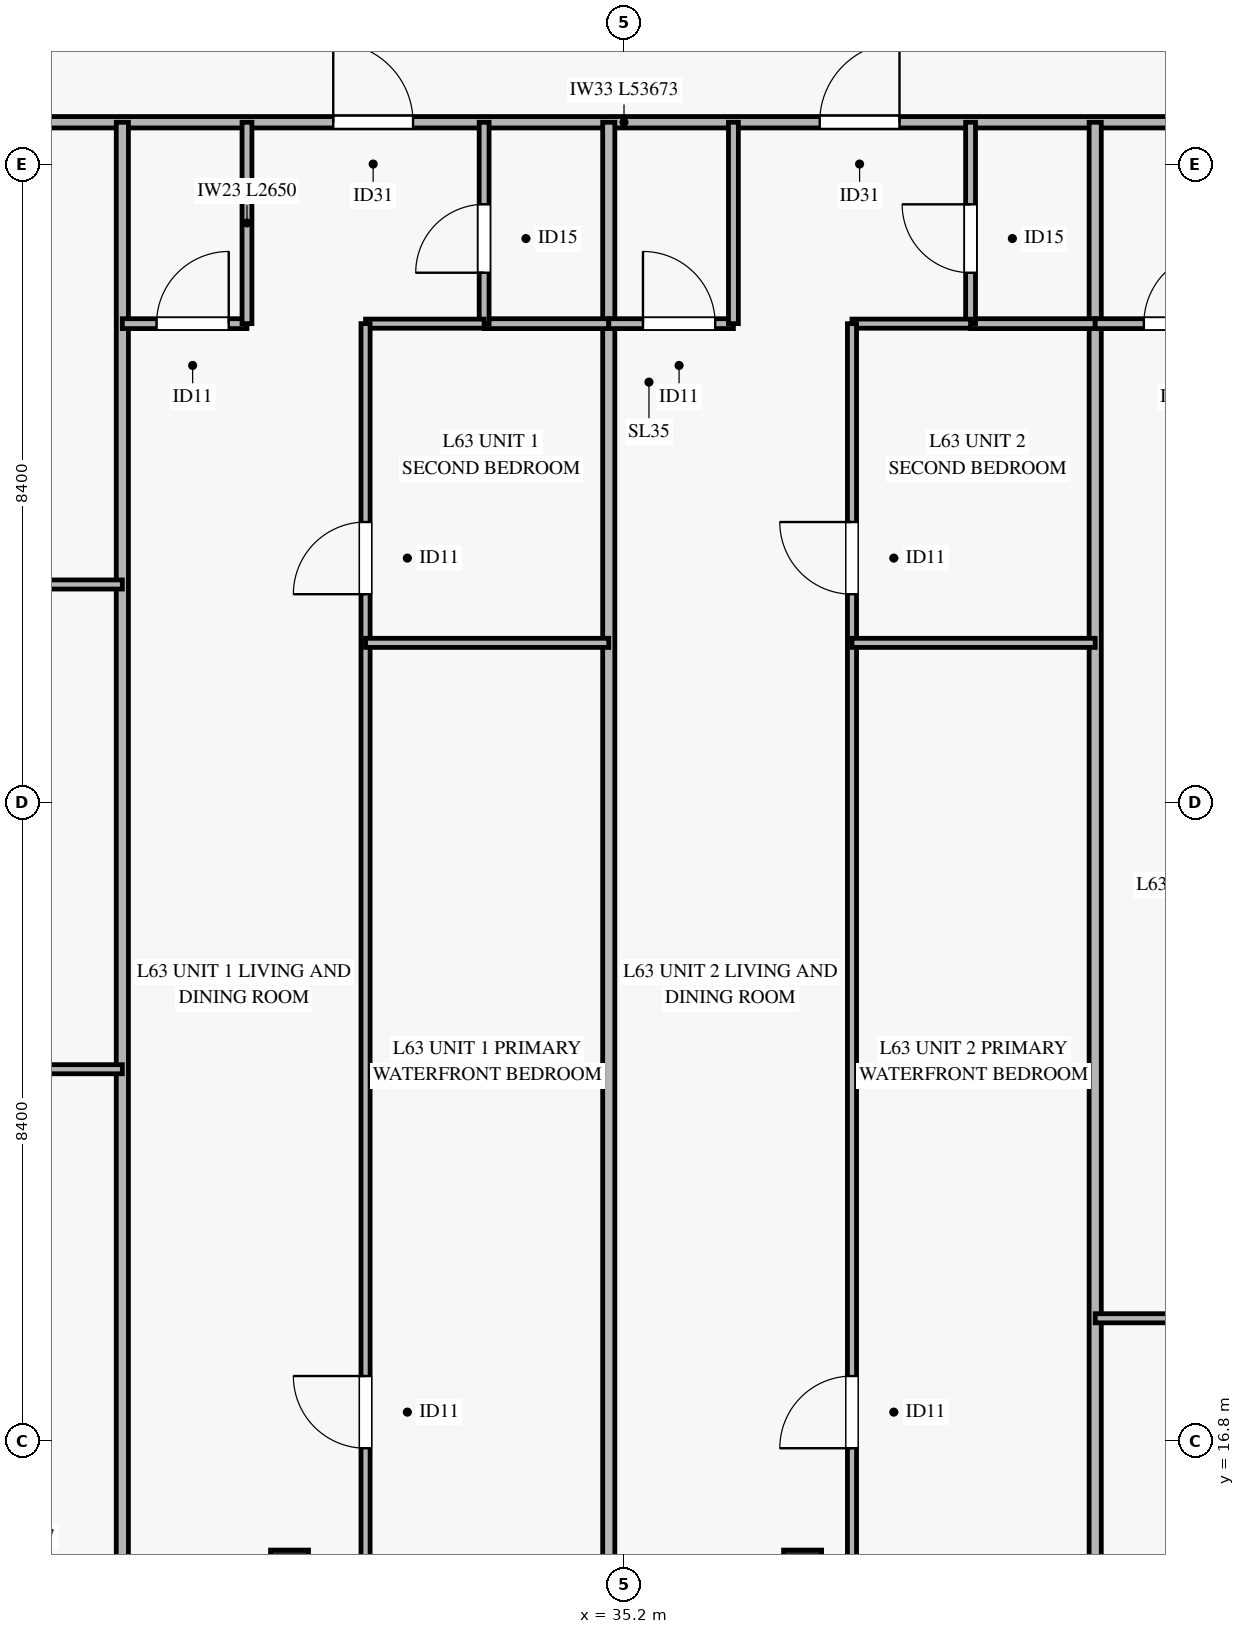
"""IFC4 building model, lengths in metres.
Left out: names, types, materials, properties, quantities, classifications, styles, units other than length and angle.
Written with IfcOpenShell. Run it as: python <this file> out.ifc"""

import sys

from ifc_helpers import new_model, si_unit, direction, frame, frame_2d, origin, origin_2d, place, context, subcontext, project, spatial, rectangle, hollow_rectangle, extrude, source, transform, mapped, element, fill, save


model = new_model("IFC4")
c1 = context("Model", 3, precision=1e-05, world=origin(), true_north=direction((0.0, 1.0)))
c2 = subcontext(c1, "Body", "Model", "MODEL_VIEW")
j1 = project(units=[si_unit("LENGTHUNIT", "METRE"), si_unit("PLANEANGLEUNIT", "RADIAN")], contexts=[c1])
p1 = place(None, origin())
s1 = spatial("IfcSite", under=j1, at=p1, CompositionType="ELEMENT")
p2 = place(p1, origin())
s2 = spatial("IfcBuilding", under=s1, at=p2, CompositionType="ELEMENT")
p3 = place(p2, frame((0.0, 0.0, 248.5)))
s3 = spatial("IfcBuildingStorey", under=s2, at=p3, CompositionType="ELEMENT", Elevation=248.5)
m1 = source(origin(), c2, "Body", "SweptSolid", [
    extrude(hollow_rectangle(XDim=0.5, YDim=0.5, WallThickness=0.024, at=origin_2d()), origin(), (0.0, 0.0, 1.0), 3.185),
])
for number, where, z_axis, x_axis in (
    (1, (30.8, 15.113, 0.0), (0.0, 0.0, 1.0), (1.0, 0.0, 0.0)),
    (2, (37.55, 15.113, 0.0), (0.0, 0.0, 1.0), (1.0, 0.0, 0.0)),
):
    element("IfcColumn", number, at=place(p3, frame(where, z_axis=z_axis, x_axis=x_axis)), inside=s3, PredefinedType="COLUMN", context=c2, shape_type="MappedRepresentation", body=[
        mapped(m1, transform((0.0, 0.0, 0.0), x_axis=(1.0, 0.0, 0.0), y_axis=(0.0, 1.0, 0.0), z_axis=(0.0, 0.0, 1.0), scale=1.0)),
    ])
p4 = place(p3, frame((8.364, 34.15, 0.0), z_axis=(0.0, 0.0, 1.0), x_axis=(1.0, 0.0, 0.0)))
e3 = element("IfcWall", 3, at=p4, inside=s3, PredefinedType="PARTITIONING", context=c2, shape_type="SweptSolid", body=[
    extrude(rectangle(XDim=53.673, YDim=0.15, at=frame_2d((26.836, 0.0))), origin(), (0.0, 0.0, 1.0), 2.47),
])
p5 = place(p4, frame((5.627, 0.0, 0.0)))
e4 = element("IfcOpeningElement", 4, at=p5, cuts=e3, PredefinedType="OPENING", context=c2, shape_type="SweptSolid", body=[
    extrude(rectangle(XDim=1.05, YDim=2.15, at=frame_2d((0.525, 1.075))), frame((0.0, 0.085, 0.0), z_axis=(0.0, -1.0, 0.0), x_axis=(1.0, 0.0, 0.0)), (0.0, 0.0, 1.0), 0.17),
])
p6 = place(p4, frame((16.561, 0.0, 0.0)))
e5 = element("IfcOpeningElement", 5, at=p6, cuts=e3, PredefinedType="OPENING", context=c2, shape_type="SweptSolid", body=[
    extrude(rectangle(XDim=1.05, YDim=2.15, at=frame_2d((0.525, 1.075))), frame((0.0, 0.085, 0.0), z_axis=(0.0, -1.0, 0.0), x_axis=(1.0, 0.0, 0.0)), (0.0, 0.0, 1.0), 0.17),
])
p7 = place(p4, frame((23.011, 0.0, 0.0)))
e6 = element("IfcOpeningElement", 6, at=p7, cuts=e3, PredefinedType="OPENING", context=c2, shape_type="SweptSolid", body=[
    extrude(rectangle(XDim=1.05, YDim=2.15, at=frame_2d((0.525, 1.075))), frame((0.0, 0.085, 0.0), z_axis=(0.0, -1.0, 0.0), x_axis=(1.0, 0.0, 0.0)), (0.0, 0.0, 1.0), 0.17),
])
p8 = place(p4, frame((29.411, 0.0, 0.0)))
e7 = element("IfcOpeningElement", 7, at=p8, cuts=e3, PredefinedType="OPENING", context=c2, shape_type="SweptSolid", body=[
    extrude(rectangle(XDim=1.05, YDim=2.15, at=frame_2d((0.525, 1.075))), frame((0.0, 0.085, 0.0), z_axis=(0.0, -1.0, 0.0), x_axis=(1.0, 0.0, 0.0)), (0.0, 0.0, 1.0), 0.17),
])
p9 = place(p4, frame((36.511, 0.0, 0.0)))
e8 = element("IfcOpeningElement", 8, at=p9, cuts=e3, PredefinedType="OPENING", context=c2, shape_type="SweptSolid", body=[
    extrude(rectangle(XDim=1.05, YDim=2.15, at=frame_2d((0.525, 1.075))), frame((0.0, 0.085, 0.0), z_axis=(0.0, -1.0, 0.0), x_axis=(1.0, 0.0, 0.0)), (0.0, 0.0, 1.0), 0.17),
])
p10 = place(p4, frame((45.807, 0.0, 0.0)))
e9 = element("IfcOpeningElement", 9, at=p10, cuts=e3, PredefinedType="OPENING", context=c2, shape_type="SweptSolid", body=[
    extrude(rectangle(XDim=1.05, YDim=2.15, at=frame_2d((0.525, 1.075))), frame((0.0, 0.085, 0.0), z_axis=(0.0, -1.0, 0.0), x_axis=(1.0, 0.0, 0.0)), (0.0, 0.0, 1.0), 0.17),
])
for number, where, z_axis, x_axis in (
    (10, (28.6, 15.113, 0.0), (0.0, 0.0, 1.0), (0.0, 1.0, 0.0)),
    (11, (35.0, 15.113, 0.0), (0.0, 0.0, 1.0), (0.0, 1.0, 0.0)),
    (12, (41.4, 15.113, 0.0), (0.0, 0.0, 1.0), (0.0, 1.0, 0.0)),
):
    element("IfcWall", number, at=place(p3, frame(where, z_axis=z_axis, x_axis=x_axis)), inside=s3, PredefinedType="PARTITIONING", context=c2, shape_type="SweptSolid", body=[
        extrude(rectangle(XDim=19.037, YDim=0.16, at=frame_2d((9.519, 0.0))), origin(), (0.0, 0.0, 1.0), 2.77),
    ])
p11 = place(p3, frame((22.4, 21.69, 0.0), z_axis=(0.0, 0.0, 1.0), x_axis=(1.0, 0.0, 0.0)))
e13 = element("IfcWall", 13, at=p11, inside=s3, PredefinedType="PARTITIONING", context=c2, shape_type="SweptSolid", body=[
    extrude(rectangle(XDim=6.2, YDim=0.12, at=frame_2d((3.1, 0.0))), origin(), (0.0, 0.0, 1.0), 3.185),
])
p12 = place(p11, frame((2.646, 0.0, 0.0)))
e14 = element("IfcOpeningElement", 14, at=p12, cuts=e13, PredefinedType="OPENING", context=c2, shape_type="SweptSolid", body=[
    extrude(rectangle(XDim=0.95, YDim=2.1, at=frame_2d((0.475, 1.05))), frame((0.0, 0.07, 0.0), z_axis=(0.0, -1.0, 0.0), x_axis=(1.0, 0.0, 0.0)), (0.0, 0.0, 1.0), 0.14),
])
p13 = place(p3, frame((22.4, 28.068, 0.0), z_axis=(0.0, 0.0, 1.0), x_axis=(1.0, 0.0, 0.0)))
e15 = element("IfcWall", 15, at=p13, inside=s3, PredefinedType="PARTITIONING", context=c2, shape_type="SweptSolid", body=[
    extrude(rectangle(XDim=6.2, YDim=0.12, at=frame_2d((3.1, 0.0))), origin(), (0.0, 0.0, 1.0), 3.185),
])
p14 = place(p13, frame((2.646, 0.0, 0.0)))
e16 = element("IfcOpeningElement", 16, at=p14, cuts=e15, PredefinedType="OPENING", context=c2, shape_type="SweptSolid", body=[
    extrude(rectangle(XDim=0.95, YDim=2.1, at=frame_2d((0.475, 1.05))), frame((0.0, 0.07, 0.0), z_axis=(0.0, -1.0, 0.0), x_axis=(1.0, 0.0, 0.0)), (0.0, 0.0, 1.0), 0.14),
])
p15 = place(p3, frame((28.6, 31.5, 0.0), z_axis=(0.0, 0.0, 1.0), x_axis=(1.0, 0.0, 0.0)))
e17 = element("IfcWall", 17, at=p15, inside=s3, PredefinedType="PARTITIONING", context=c2, shape_type="SweptSolid", body=[
    extrude(rectangle(XDim=1.64, YDim=0.13, at=frame_2d((0.82, 0.0))), origin(), (0.0, 0.0, 1.0), 3.185),
])
p16 = place(p15, frame((0.45, 0.0, 0.0)))
e18 = element("IfcOpeningElement", 18, at=p16, cuts=e17, PredefinedType="OPENING", context=c2, shape_type="SweptSolid", body=[
    extrude(rectangle(XDim=0.95, YDim=2.1, at=frame_2d((0.475, 1.05))), frame((0.0, 0.075, 0.0), z_axis=(0.0, -1.0, 0.0), x_axis=(1.0, 0.0, 0.0)), (0.0, 0.0, 1.0), 0.15),
])
p17 = place(p3, frame((30.24, 31.5, 0.0), z_axis=(0.0, 0.0, 1.0), x_axis=(0.0, 1.0, 0.0)))
e19 = element("IfcWall", 19, at=p17, inside=s3, PredefinedType="PARTITIONING", context=c2, shape_type="SweptSolid", body=[
    extrude(rectangle(XDim=2.65, YDim=0.13, at=frame_2d((1.325, 0.0))), origin(), (0.0, 0.0, 1.0), 2.77),
])
p18 = place(p3, frame((33.36, 31.5, 0.0), z_axis=(0.0, 0.0, 1.0), x_axis=(1.0, 0.0, 0.0)))
e20 = element("IfcWall", 20, at=p18, inside=s3, PredefinedType="PARTITIONING", context=c2, shape_type="SweptSolid", body=[
    extrude(rectangle(XDim=1.64, YDim=0.13, at=frame_2d((0.82, 0.0))), origin(), (0.0, 0.0, 1.0), 3.185),
])
p19 = place(p3, frame((33.36, 31.5, 0.0), z_axis=(0.0, 0.0, 1.0), x_axis=(0.0, 1.0, 0.0)))
e21 = element("IfcWall", 21, at=p19, inside=s3, PredefinedType="PARTITIONING", context=c2, shape_type="SweptSolid", body=[
    extrude(rectangle(XDim=2.65, YDim=0.13, at=frame_2d((1.325, 0.0))), origin(), (0.0, 0.0, 1.0), 2.77),
])
p20 = place(p19, frame((0.67, 0.0, 0.0)))
e22 = element("IfcOpeningElement", 22, at=p20, cuts=e21, PredefinedType="OPENING", context=c2, shape_type="SweptSolid", body=[
    extrude(rectangle(XDim=0.9, YDim=2.1, at=frame_2d((0.45, 1.05))), frame((0.0, 0.075, 0.0), z_axis=(0.0, -1.0, 0.0), x_axis=(1.0, 0.0, 0.0)), (0.0, 0.0, 1.0), 0.15),
])
p21 = place(p3, frame((31.8, 31.5, 0.0), z_axis=(0.0, 0.0, 1.0), x_axis=(1.0, 0.0, 0.0)))
e23 = element("IfcWall", 23, at=p21, inside=s3, PredefinedType="PARTITIONING", context=c2, shape_type="SweptSolid", body=[
    extrude(rectangle(XDim=1.56, YDim=0.12, at=frame_2d((0.78, 0.0))), origin(), (0.0, 0.0, 1.0), 3.185),
])
p22 = place(p3, frame((31.8, 15.113, 0.0), z_axis=(0.0, 0.0, 1.0), x_axis=(0.0, 1.0, 0.0)))
e24 = element("IfcWall", 24, at=p22, inside=s3, PredefinedType="PARTITIONING", context=c2, shape_type="SweptSolid", body=[
    extrude(rectangle(XDim=16.387, YDim=0.12, at=frame_2d((8.193, 0.0))), origin(), (0.0, 0.0, 1.0), 2.77),
])
p23 = place(p22, frame((1.59, 0.0, 0.0)))
e25 = element("IfcOpeningElement", 25, at=p23, cuts=e24, PredefinedType="OPENING", context=c2, shape_type="SweptSolid", body=[
    extrude(rectangle(XDim=0.95, YDim=2.1, at=frame_2d((0.475, 1.05))), frame((0.0, 0.07, 0.0), z_axis=(0.0, -1.0, 0.0), x_axis=(1.0, 0.0, 0.0)), (0.0, 0.0, 1.0), 0.14),
])
p24 = place(p22, frame((12.827, 0.0, 0.0)))
e26 = element("IfcOpeningElement", 26, at=p24, cuts=e24, PredefinedType="OPENING", context=c2, shape_type="SweptSolid", body=[
    extrude(rectangle(XDim=0.95, YDim=2.1, at=frame_2d((0.475, 1.05))), frame((0.0, 0.07, 0.0), z_axis=(0.0, -1.0, 0.0), x_axis=(1.0, 0.0, 0.0)), (0.0, 0.0, 1.0), 0.14),
])
p25 = place(p3, frame((31.8, 27.3, 0.0), z_axis=(0.0, 0.0, 1.0), x_axis=(1.0, 0.0, 0.0)))
e27 = element("IfcWall", 27, at=p25, inside=s3, PredefinedType="PARTITIONING", context=c2, shape_type="SweptSolid", body=[
    extrude(rectangle(XDim=3.2, YDim=0.12, at=frame_2d((1.6, 0.0))), origin(), (0.0, 0.0, 1.0), 3.185),
])
p26 = place(p3, frame((35.0, 31.5, 0.0), z_axis=(0.0, 0.0, 1.0), x_axis=(1.0, 0.0, 0.0)))
e28 = element("IfcWall", 28, at=p26, inside=s3, PredefinedType="PARTITIONING", context=c2, shape_type="SweptSolid", body=[
    extrude(rectangle(XDim=1.64, YDim=0.13, at=frame_2d((0.82, 0.0))), origin(), (0.0, 0.0, 1.0), 3.185),
])
p27 = place(p26, frame((0.45, 0.0, 0.0)))
e29 = element("IfcOpeningElement", 29, at=p27, cuts=e28, PredefinedType="OPENING", context=c2, shape_type="SweptSolid", body=[
    extrude(rectangle(XDim=0.95, YDim=2.1, at=frame_2d((0.475, 1.05))), frame((0.0, 0.075, 0.0), z_axis=(0.0, -1.0, 0.0), x_axis=(1.0, 0.0, 0.0)), (0.0, 0.0, 1.0), 0.15),
])
p28 = place(p3, frame((36.64, 31.5, 0.0), z_axis=(0.0, 0.0, 1.0), x_axis=(0.0, 1.0, 0.0)))
e30 = element("IfcWall", 30, at=p28, inside=s3, PredefinedType="PARTITIONING", context=c2, shape_type="SweptSolid", body=[
    extrude(rectangle(XDim=2.65, YDim=0.13, at=frame_2d((1.325, 0.0))), origin(), (0.0, 0.0, 1.0), 2.77),
])
p29 = place(p3, frame((39.76, 31.5, 0.0), z_axis=(0.0, 0.0, 1.0), x_axis=(1.0, 0.0, 0.0)))
e31 = element("IfcWall", 31, at=p29, inside=s3, PredefinedType="PARTITIONING", context=c2, shape_type="SweptSolid", body=[
    extrude(rectangle(XDim=1.64, YDim=0.13, at=frame_2d((0.82, 0.0))), origin(), (0.0, 0.0, 1.0), 3.185),
])
p30 = place(p3, frame((39.76, 31.5, 0.0), z_axis=(0.0, 0.0, 1.0), x_axis=(0.0, 1.0, 0.0)))
e32 = element("IfcWall", 32, at=p30, inside=s3, PredefinedType="PARTITIONING", context=c2, shape_type="SweptSolid", body=[
    extrude(rectangle(XDim=2.65, YDim=0.13, at=frame_2d((1.325, 0.0))), origin(), (0.0, 0.0, 1.0), 2.77),
])
p31 = place(p30, frame((0.67, 0.0, 0.0)))
e33 = element("IfcOpeningElement", 33, at=p31, cuts=e32, PredefinedType="OPENING", context=c2, shape_type="SweptSolid", body=[
    extrude(rectangle(XDim=0.9, YDim=2.1, at=frame_2d((0.45, 1.05))), frame((0.0, 0.075, 0.0), z_axis=(0.0, -1.0, 0.0), x_axis=(1.0, 0.0, 0.0)), (0.0, 0.0, 1.0), 0.15),
])
p32 = place(p3, frame((38.2, 31.5, 0.0), z_axis=(0.0, 0.0, 1.0), x_axis=(1.0, 0.0, 0.0)))
e34 = element("IfcWall", 34, at=p32, inside=s3, PredefinedType="PARTITIONING", context=c2, shape_type="SweptSolid", body=[
    extrude(rectangle(XDim=1.56, YDim=0.12, at=frame_2d((0.78, 0.0))), origin(), (0.0, 0.0, 1.0), 3.185),
])
p33 = place(p3, frame((38.2, 15.113, 0.0), z_axis=(0.0, 0.0, 1.0), x_axis=(0.0, 1.0, 0.0)))
e35 = element("IfcWall", 35, at=p33, inside=s3, PredefinedType="PARTITIONING", context=c2, shape_type="SweptSolid", body=[
    extrude(rectangle(XDim=16.387, YDim=0.12, at=frame_2d((8.193, 0.0))), origin(), (0.0, 0.0, 1.0), 2.77),
])
p34 = place(p33, frame((1.59, 0.0, 0.0)))
e36 = element("IfcOpeningElement", 36, at=p34, cuts=e35, PredefinedType="OPENING", context=c2, shape_type="SweptSolid", body=[
    extrude(rectangle(XDim=0.95, YDim=2.1, at=frame_2d((0.475, 1.05))), frame((0.0, 0.07, 0.0), z_axis=(0.0, -1.0, 0.0), x_axis=(1.0, 0.0, 0.0)), (0.0, 0.0, 1.0), 0.14),
])
p35 = place(p33, frame((12.827, 0.0, 0.0)))
e37 = element("IfcOpeningElement", 37, at=p35, cuts=e35, PredefinedType="OPENING", context=c2, shape_type="SweptSolid", body=[
    extrude(rectangle(XDim=0.95, YDim=2.1, at=frame_2d((0.475, 1.05))), frame((0.0, 0.07, 0.0), z_axis=(0.0, -1.0, 0.0), x_axis=(1.0, 0.0, 0.0)), (0.0, 0.0, 1.0), 0.14),
])
p36 = place(p3, frame((38.2, 27.3, 0.0), z_axis=(0.0, 0.0, 1.0), x_axis=(1.0, 0.0, 0.0)))
e38 = element("IfcWall", 38, at=p36, inside=s3, PredefinedType="PARTITIONING", context=c2, shape_type="SweptSolid", body=[
    extrude(rectangle(XDim=3.2, YDim=0.12, at=frame_2d((1.6, 0.0))), origin(), (0.0, 0.0, 1.0), 3.185),
])
p37 = place(p3, frame((41.4, 31.5, 0.0), z_axis=(0.0, 0.0, 1.0), x_axis=(1.0, 0.0, 0.0)))
e39 = element("IfcWall", 39, at=p37, inside=s3, PredefinedType="PARTITIONING", context=c2, shape_type="SweptSolid", body=[
    extrude(rectangle(XDim=1.99, YDim=0.13, at=frame_2d((0.995, 0.0))), origin(), (0.0, 0.0, 1.0), 3.185),
])
p38 = place(p37, frame((0.64, 0.0, 0.0)))
e40 = element("IfcOpeningElement", 40, at=p38, cuts=e39, PredefinedType="OPENING", context=c2, shape_type="SweptSolid", body=[
    extrude(rectangle(XDim=0.95, YDim=2.1, at=frame_2d((0.475, 1.05))), frame((0.0, 0.075, 0.0), z_axis=(0.0, -1.0, 0.0), x_axis=(1.0, 0.0, 0.0)), (0.0, 0.0, 1.0), 0.15),
])
p39 = place(p3, frame((41.4, 18.413, 0.0), z_axis=(0.0, 0.0, 1.0), x_axis=(1.0, 0.0, 0.0)))
e41 = element("IfcWall", 41, at=p39, inside=s3, PredefinedType="PARTITIONING", context=c2, shape_type="SweptSolid", body=[
    extrude(rectangle(XDim=3.9, YDim=0.12, at=frame_2d((1.95, 0.0))), origin(), (0.0, 0.0, 1.0), 2.47),
])
p40 = place(p39, frame((1.665, 0.0, 0.0)))
e42 = element("IfcOpeningElement", 42, at=p40, cuts=e41, PredefinedType="OPENING", context=c2, shape_type="SweptSolid", body=[
    extrude(rectangle(XDim=0.95, YDim=2.1, at=frame_2d((0.475, 1.05))), frame((0.0, 0.07, 0.0), z_axis=(0.0, -1.0, 0.0), x_axis=(1.0, 0.0, 0.0)), (0.0, 0.0, 1.0), 0.14),
])
m2 = source(origin(), c2, "Body", "SweptSolid", [
    extrude(rectangle(XDim=1.05, YDim=2.15, at=frame_2d((0.525, 1.075))), frame((0.0, 0.025, 0.0), z_axis=(0.0, -1.0, 0.0), x_axis=(1.0, 0.0, 0.0)), (0.0, 0.0, 1.0), 0.05),
])
p41 = place(p7, origin())
e43 = element("IfcDoor", 43, at=p41, inside=s3, OperationType="SINGLE_SWING_LEFT", PredefinedType="DOOR", context=c2, shape_type="MappedRepresentation", body=[
    mapped(m2, transform((0.0, 0.0, 0.0), x_axis=(1.0, 0.0, 0.0), y_axis=(0.0, 1.0, 0.0), z_axis=(0.0, 0.0, 1.0), scale=1.0)),
])
fill(e6, e43)
m3 = source(origin(), c2, "Body", "SweptSolid", [
    extrude(rectangle(XDim=0.95, YDim=2.1, at=frame_2d((0.475, 1.05))), frame((0.0, 0.025, 0.0), z_axis=(0.0, -1.0, 0.0), x_axis=(1.0, 0.0, 0.0)), (0.0, 0.0, 1.0), 0.05),
])
p42 = place(p16, origin())
e44 = element("IfcDoor", 44, at=p42, inside=s3, OperationType="SINGLE_SWING_RIGHT", PredefinedType="DOOR", context=c2, shape_type="MappedRepresentation", body=[
    mapped(m3, transform((0.0, 0.0, 0.0), x_axis=(1.0, 0.0, 0.0), y_axis=(0.0, 1.0, 0.0), z_axis=(0.0, 0.0, 1.0), scale=1.0)),
])
fill(e18, e44)
m4 = source(origin(), c2, "Body", "SweptSolid", [
    extrude(rectangle(XDim=0.9, YDim=2.1, at=frame_2d((0.45, 1.05))), frame((0.0, 0.025, 0.0), z_axis=(0.0, -1.0, 0.0), x_axis=(1.0, 0.0, 0.0)), (0.0, 0.0, 1.0), 0.05),
])
p43 = place(p20, origin())
e45 = element("IfcDoor", 45, at=p43, inside=s3, OperationType="SINGLE_SWING_LEFT", PredefinedType="DOOR", context=c2, shape_type="MappedRepresentation", body=[
    mapped(m4, transform((0.0, 0.0, 0.0), x_axis=(1.0, 0.0, 0.0), y_axis=(0.0, 1.0, 0.0), z_axis=(0.0, 0.0, 1.0), scale=1.0)),
])
fill(e22, e45)
p44 = place(p23, origin())
e46 = element("IfcDoor", 46, at=p44, inside=s3, OperationType="SINGLE_SWING_RIGHT", PredefinedType="DOOR", context=c2, shape_type="MappedRepresentation", body=[
    mapped(m3, transform((0.0, 0.0, 0.0), x_axis=(1.0, 0.0, 0.0), y_axis=(0.0, 1.0, 0.0), z_axis=(0.0, 0.0, 1.0), scale=1.0)),
])
fill(e25, e46)
p45 = place(p24, origin())
e47 = element("IfcDoor", 47, at=p45, inside=s3, OperationType="SINGLE_SWING_LEFT", PredefinedType="DOOR", context=c2, shape_type="MappedRepresentation", body=[
    mapped(m3, transform((0.0, 0.0, 0.0), x_axis=(1.0, 0.0, 0.0), y_axis=(0.0, 1.0, 0.0), z_axis=(0.0, 0.0, 1.0), scale=1.0)),
])
fill(e26, e47)
p46 = place(p8, origin())
e48 = element("IfcDoor", 48, at=p46, inside=s3, OperationType="SINGLE_SWING_RIGHT", PredefinedType="DOOR", context=c2, shape_type="MappedRepresentation", body=[
    mapped(m2, transform((0.0, 0.0, 0.0), x_axis=(1.0, 0.0, 0.0), y_axis=(0.0, 1.0, 0.0), z_axis=(0.0, 0.0, 1.0), scale=1.0)),
])
fill(e7, e48)
p47 = place(p27, origin())
e49 = element("IfcDoor", 49, at=p47, inside=s3, OperationType="SINGLE_SWING_LEFT", PredefinedType="DOOR", context=c2, shape_type="MappedRepresentation", body=[
    mapped(m3, transform((0.0, 0.0, 0.0), x_axis=(1.0, 0.0, 0.0), y_axis=(0.0, 1.0, 0.0), z_axis=(0.0, 0.0, 1.0), scale=1.0)),
])
fill(e29, e49)
p48 = place(p31, origin())
e50 = element("IfcDoor", 50, at=p48, inside=s3, OperationType="SINGLE_SWING_RIGHT", PredefinedType="DOOR", context=c2, shape_type="MappedRepresentation", body=[
    mapped(m4, transform((0.0, 0.0, 0.0), x_axis=(1.0, 0.0, 0.0), y_axis=(0.0, 1.0, 0.0), z_axis=(0.0, 0.0, 1.0), scale=1.0)),
])
fill(e33, e50)
p49 = place(p34, origin())
e51 = element("IfcDoor", 51, at=p49, inside=s3, OperationType="SINGLE_SWING_LEFT", PredefinedType="DOOR", context=c2, shape_type="MappedRepresentation", body=[
    mapped(m3, transform((0.0, 0.0, 0.0), x_axis=(1.0, 0.0, 0.0), y_axis=(0.0, 1.0, 0.0), z_axis=(0.0, 0.0, 1.0), scale=1.0)),
])
fill(e36, e51)
p50 = place(p35, origin())
e52 = element("IfcDoor", 52, at=p50, inside=s3, OperationType="SINGLE_SWING_RIGHT", PredefinedType="DOOR", context=c2, shape_type="MappedRepresentation", body=[
    mapped(m3, transform((0.0, 0.0, 0.0), x_axis=(1.0, 0.0, 0.0), y_axis=(0.0, 1.0, 0.0), z_axis=(0.0, 0.0, 1.0), scale=1.0)),
])
fill(e37, e52)
p51 = place(p38, origin())
e53 = element("IfcDoor", 53, at=p51, inside=s3, OperationType="SINGLE_SWING_RIGHT", PredefinedType="DOOR", context=c2, shape_type="MappedRepresentation", body=[
    mapped(m3, transform((0.0, 0.0, 0.0), x_axis=(1.0, 0.0, 0.0), y_axis=(0.0, 1.0, 0.0), z_axis=(0.0, 0.0, 1.0), scale=1.0)),
])
fill(e40, e53)
save(model, sys.argv[1])
